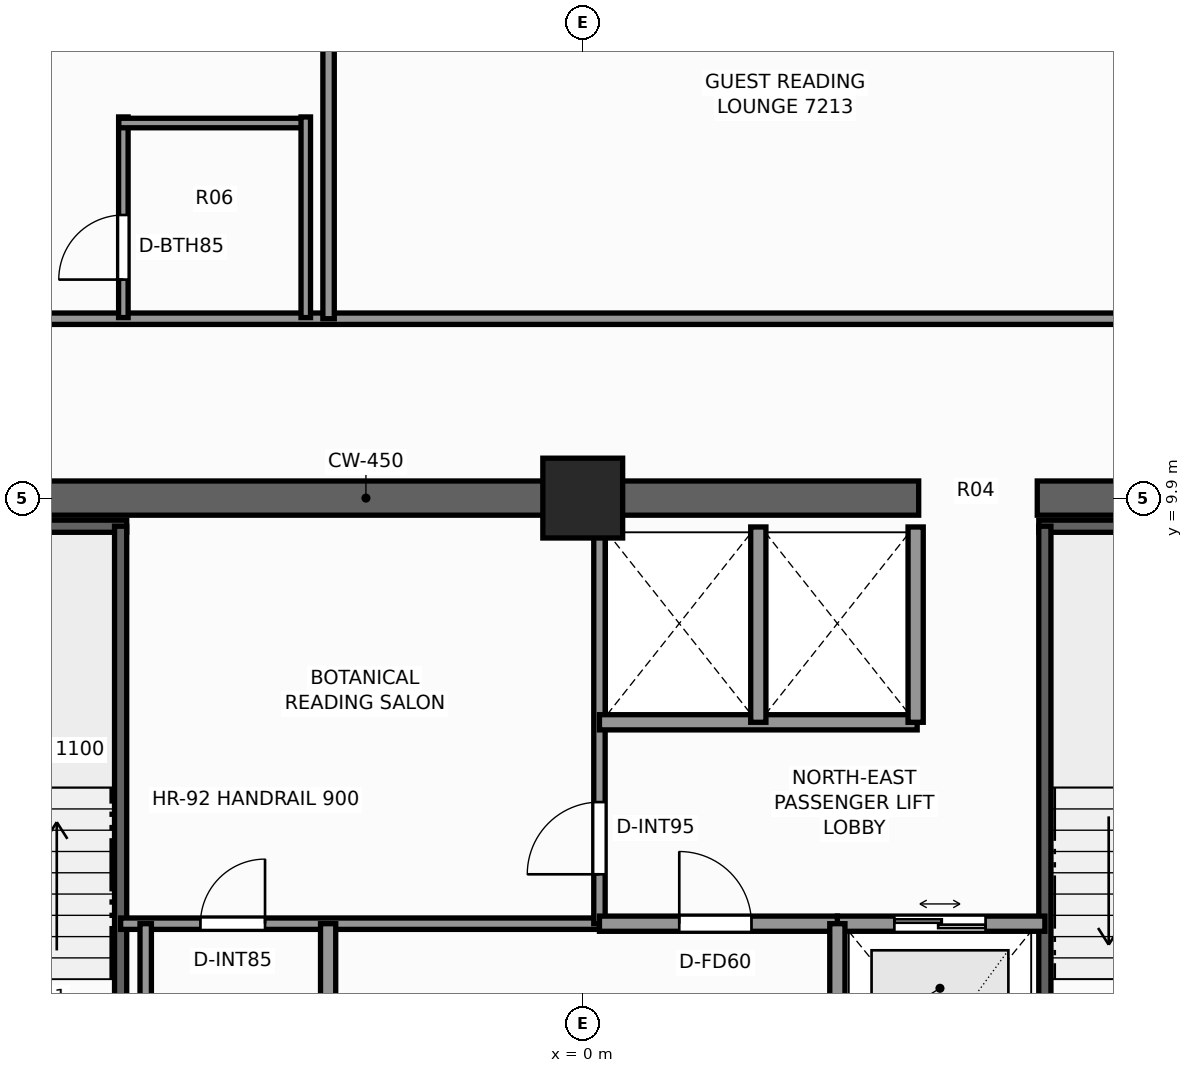
"""IFC4 building model, lengths in metres.
Left out: names, types, materials, properties, quantities, classifications, styles, units other than length and angle.
Written with IfcOpenShell. Run it as: python <this file> out.ifc"""

import sys

from ifc_helpers import new_model, si_unit, direction, frame, frame_2d, origin, origin_2d, place, context, subcontext, project, spatial, rectangle, extrude, element, fill, save


model = new_model("IFC4")
c1 = context("Model", 3, precision=1e-05, world=origin(), true_north=direction((0.0, 1.0)))
c2 = subcontext(c1, "Body", "Model", "MODEL_VIEW")
j1 = project(units=[si_unit("LENGTHUNIT", "METRE"), si_unit("PLANEANGLEUNIT", "RADIAN")], contexts=[c1])
p1 = place(None, origin())
s1 = spatial("IfcSite", under=j1, at=p1, CompositionType="ELEMENT")
p2 = place(p1, origin())
s2 = spatial("IfcBuilding", under=s1, at=p2, CompositionType="ELEMENT")
p3 = place(p2, frame((0.0, 0.0, 247.9)))
s3 = spatial("IfcBuildingStorey", under=s2, at=p3, CompositionType="ELEMENT", Elevation=247.9)
p4 = place(p3, frame((-10.125, 9.9, 0.0), z_axis=(0.0, 0.0, 1.0), x_axis=(1.0, 0.0, 0.0)))
e1 = element("IfcWall", 1, at=p4, inside=s3, PredefinedType="SHEAR", context=c2, shape_type="SweptSolid", body=[
    extrude(rectangle(XDim=14.545, YDim=0.45, at=frame_2d((7.272, 0.0))), origin(), (0.0, 0.0, 1.0), 3.5),
])
p5 = place(p3, frame((5.98, 9.9, 0.0), z_axis=(0.0, 0.0, 1.0), x_axis=(1.0, 0.0, 0.0)))
e2 = element("IfcWall", 2, at=p5, inside=s3, PredefinedType="SHEAR", context=c2, shape_type="SweptSolid", body=[
    extrude(rectangle(XDim=4.145, YDim=0.45, at=frame_2d((2.073, 0.0))), origin(), (0.0, 0.0, 1.0), 3.5),
])
p6 = place(p3, frame((0.0, 9.9, 0.0), z_axis=(0.0, 0.0, 1.0), x_axis=(1.0, 0.0, 0.0)))
e3 = element("IfcColumn", 3, at=p6, inside=s3, PredefinedType="COLUMN", context=c2, shape_type="SweptSolid", body=[
    extrude(rectangle(XDim=1.05, YDim=1.05, at=origin_2d()), origin(), (0.0, 0.0, 1.0), 3.5),
])
p7 = place(p3, frame((-9.52, 9.53, 0.0), z_axis=(0.0, 0.0, 1.0), x_axis=(1.0, 0.0, 0.0)))
e4 = element("IfcWall", 4, at=p7, inside=s3, PredefinedType="SHEAR", context=c2, shape_type="SweptSolid", body=[
    extrude(rectangle(XDim=3.52, YDim=0.16, at=frame_2d((1.76, 0.0))), origin(), (0.0, 0.0, 1.0), 3.5),
])
p8 = place(p3, frame((-6.08, 1.97, 0.0), z_axis=(0.0, 0.0, 1.0), x_axis=(0.0, 1.0, 0.0)))
e5 = element("IfcWall", 5, at=p8, inside=s3, PredefinedType="SHEAR", context=c2, shape_type="SweptSolid", body=[
    extrude(rectangle(XDim=7.56, YDim=0.16, at=frame_2d((3.78, 0.0))), origin(), (0.0, 0.0, 1.0), 3.5),
])
p9 = place(p3, frame((6.0, 9.53, 0.0), z_axis=(0.0, 0.0, 1.0), x_axis=(1.0, 0.0, 0.0)))
e6 = element("IfcWall", 6, at=p9, inside=s3, PredefinedType="SHEAR", context=c2, shape_type="SweptSolid", body=[
    extrude(rectangle(XDim=3.52, YDim=0.16, at=frame_2d((1.76, 0.0))), origin(), (0.0, 0.0, 1.0), 3.5),
])
p10 = place(p3, frame((6.08, 1.97, 0.0), z_axis=(0.0, 0.0, 1.0), x_axis=(0.0, 1.0, 0.0)))
e7 = element("IfcWall", 7, at=p10, inside=s3, PredefinedType="SHEAR", context=c2, shape_type="SweptSolid", body=[
    extrude(rectangle(XDim=7.56, YDim=0.16, at=frame_2d((3.78, 0.0))), origin(), (0.0, 0.0, 1.0), 3.5),
])
p11 = place(p3, frame((3.35, 4.3, 0.0), z_axis=(0.0, 0.0, 1.0), x_axis=(1.0, 0.0, 0.0)))
e8 = element("IfcWall", 8, at=p11, inside=s3, PredefinedType="SOLIDWALL", context=c2, shape_type="SweptSolid", body=[
    extrude(rectangle(XDim=2.73, YDim=0.2, at=frame_2d((1.365, 0.0))), origin(), (0.0, 0.0, 1.0), 3.25),
])
p12 = place(p11, frame((0.75, 0.0, 0.0)))
e9 = element("IfcOpeningElement", 9, at=p12, cuts=e8, PredefinedType="OPENING", context=c2, shape_type="SweptSolid", body=[
    extrude(rectangle(XDim=1.2, YDim=2.25, at=frame_2d((0.6, 1.125))), frame((0.0, 0.11, 0.0), z_axis=(0.0, -1.0, 0.0), x_axis=(1.0, 0.0, 0.0)), (0.0, 0.0, 1.0), 0.22),
])
p13 = place(p3, frame((-6.08, 4.3, 0.0), z_axis=(0.0, 0.0, 1.0), x_axis=(1.0, 0.0, 0.0)))
e10 = element("IfcWall", 10, at=p13, inside=s3, PredefinedType="PARTITIONING", context=c2, shape_type="SweptSolid", body=[
    extrude(rectangle(XDim=6.3, YDim=0.15, at=frame_2d((3.15, 0.0))), origin(), (0.0, 0.0, 1.0), 3.25),
])
p14 = place(p13, frame((1.05, 0.0, 0.0)))
e11 = element("IfcOpeningElement", 11, at=p14, cuts=e10, PredefinedType="OPENING", context=c2, shape_type="SweptSolid", body=[
    extrude(rectangle(XDim=0.85, YDim=2.03, at=frame_2d((0.425, 1.015))), frame((0.0, 0.085, 0.0), z_axis=(0.0, -1.0, 0.0), x_axis=(1.0, 0.0, 0.0)), (0.0, 0.0, 1.0), 0.17),
])
p15 = place(p3, frame((0.22, 4.3, 0.0), z_axis=(0.0, 0.0, 1.0), x_axis=(0.0, 1.0, 0.0)))
e12 = element("IfcWall", 12, at=p15, inside=s3, PredefinedType="PARTITIONING", context=c2, shape_type="SweptSolid", body=[
    extrude(rectangle(XDim=5.22, YDim=0.15, at=frame_2d((2.61, 0.0))), origin(), (0.0, 0.0, 1.0), 3.25),
])
p16 = place(p15, frame((0.65, 0.0, 0.0)))
e13 = element("IfcOpeningElement", 13, at=p16, cuts=e12, PredefinedType="OPENING", context=c2, shape_type="SweptSolid", body=[
    extrude(rectangle(XDim=0.95, YDim=2.06, at=frame_2d((0.475, 1.03))), frame((0.0, 0.085, 0.0), z_axis=(0.0, -1.0, 0.0), x_axis=(1.0, 0.0, 0.0)), (0.0, 0.0, 1.0), 0.17),
])
p17 = place(p3, frame((0.22, 6.95, 0.0), z_axis=(0.0, 0.0, 1.0), x_axis=(1.0, 0.0, 0.0)))
e14 = element("IfcWall", 14, at=p17, inside=s3, PredefinedType="SOLIDWALL", context=c2, shape_type="SweptSolid", body=[
    extrude(rectangle(XDim=4.18, YDim=0.2, at=frame_2d((2.09, 0.0))), origin(), (0.0, 0.0, 1.0), 3.25),
])
for number, where, z_axis, x_axis in (
    (15, (4.38, 6.95, 0.0), (0.0, 0.0, 1.0), (0.0, 1.0, 0.0)),
    (16, (2.31, 6.95, 0.0), (0.0, 0.0, 1.0), (0.0, 1.0, 0.0)),
):
    element("IfcWall", number, at=place(p3, frame(where, z_axis=z_axis, x_axis=x_axis)), inside=s3, PredefinedType="SOLIDWALL", context=c2, shape_type="SweptSolid", body=[
        extrude(rectangle(XDim=2.57, YDim=0.2, at=frame_2d((1.285, 0.0))), origin(), (0.0, 0.0, 1.0), 3.25),
    ])
p18 = place(p3, frame((0.22, 4.3, 0.0), z_axis=(0.0, 0.0, 1.0), x_axis=(1.0, 0.0, 0.0)))
e17 = element("IfcWall", 17, at=p18, inside=s3, PredefinedType="SOLIDWALL", context=c2, shape_type="SweptSolid", body=[
    extrude(rectangle(XDim=3.13, YDim=0.2, at=frame_2d((1.565, 0.0))), origin(), (0.0, 0.0, 1.0), 3.25),
])
p19 = place(p18, frame((1.05, 0.0, 0.0)))
e18 = element("IfcOpeningElement", 18, at=p19, cuts=e17, PredefinedType="OPENING", context=c2, shape_type="SweptSolid", body=[
    extrude(rectangle(XDim=0.95, YDim=2.06, at=frame_2d((0.475, 1.03))), frame((0.0, 0.11, 0.0), z_axis=(0.0, -1.0, 0.0), x_axis=(1.0, 0.0, 0.0)), (0.0, 0.0, 1.0), 0.22),
])
for number, where, z_axis, x_axis in (
    (19, (-3.35, 1.1, 0.0), (0.0, 0.0, 1.0), (0.0, 1.0, 0.0)),
    (20, (3.35, 1.1, 0.0), (0.0, 0.0, 1.0), (0.0, 1.0, 0.0)),
):
    element("IfcWall", number, at=place(p3, frame(where, z_axis=z_axis, x_axis=x_axis)), inside=s3, PredefinedType="SOLIDWALL", context=c2, shape_type="SweptSolid", body=[
        extrude(rectangle(XDim=3.2, YDim=0.2, at=frame_2d((1.6, 0.0))), origin(), (0.0, 0.0, 1.0), 3.25),
    ])
p20 = place(p3, frame((-5.75, 1.97, 0.0), z_axis=(0.0, 0.0, 1.0), x_axis=(0.0, 1.0, 0.0)))
e21 = element("IfcWall", 21, at=p20, inside=s3, PredefinedType="PARTITIONING", context=c2, shape_type="SweptSolid", body=[
    extrude(rectangle(XDim=2.33, YDim=0.15, at=frame_2d((1.165, 0.0))), origin(), (0.0, 0.0, 1.0), 3.25),
])
p21 = place(p3, frame((-12.58, 12.26, 0.0), z_axis=(0.0, 0.0, 1.0), x_axis=(1.0, 0.0, 0.0)))
e22 = element("IfcWall", 22, at=p21, inside=s3, PredefinedType="PARTITIONING", context=c2, shape_type="SweptSolid", body=[
    extrude(rectangle(XDim=24.84, YDim=0.15, at=frame_2d((12.42, 0.0))), origin(), (0.0, 0.0, 1.0), 2.539),
])
p22 = place(p21, frame((4.073, 0.0, 0.0)))
e23 = element("IfcOpeningElement", 23, at=p22, cuts=e22, PredefinedType="OPENING", context=c2, shape_type="SweptSolid", body=[
    extrude(rectangle(XDim=0.95, YDim=2.06, at=frame_2d((0.475, 1.03))), frame((0.0, 0.085, 0.0), z_axis=(0.0, -1.0, 0.0), x_axis=(1.0, 0.0, 0.0)), (0.0, 0.0, 1.0), 0.17),
])
p23 = place(p21, frame((19.665, 0.0, 0.0)))
e24 = element("IfcOpeningElement", 24, at=p23, cuts=e22, PredefinedType="OPENING", context=c2, shape_type="SweptSolid", body=[
    extrude(rectangle(XDim=0.9, YDim=2.06, at=frame_2d((0.45, 1.03))), frame((0.0, 0.085, 0.0), z_axis=(0.0, -1.0, 0.0), x_axis=(1.0, 0.0, 0.0)), (0.0, 0.0, 1.0), 0.17),
])
p24 = place(p3, frame((-3.344, 12.26, 0.0), z_axis=(0.0, 0.0, 1.0), x_axis=(0.0, 1.0, 0.0)))
e25 = element("IfcWall", 25, at=p24, inside=s3, PredefinedType="PARTITIONING", context=c2, shape_type="SweptSolid", body=[
    extrude(rectangle(XDim=6.12, YDim=0.15, at=frame_2d((3.06, 0.0))), origin(), (0.0, 0.0, 1.0), 2.539),
])
p25 = place(p3, frame((-6.044, 12.275, 0.0), z_axis=(0.0, 0.0, 1.0), x_axis=(0.0, 1.0, 0.0)))
e26 = element("IfcWall", 26, at=p25, inside=s3, PredefinedType="PARTITIONING", context=c2, shape_type="SweptSolid", body=[
    extrude(rectangle(XDim=2.64, YDim=0.125, at=frame_2d((1.32, 0.0))), origin(), (0.0, 0.0, 1.0), 3.25),
])
p26 = place(p25, frame((0.5, 0.0, 0.0)))
e27 = element("IfcOpeningElement", 27, at=p26, cuts=e26, PredefinedType="OPENING", context=c2, shape_type="SweptSolid", body=[
    extrude(rectangle(XDim=0.85, YDim=2.03, at=frame_2d((0.425, 1.015))), frame((0.0, 0.073, 0.0), z_axis=(0.0, -1.0, 0.0), x_axis=(1.0, 0.0, 0.0)), (0.0, 0.0, 1.0), 0.145),
])
p27 = place(p3, frame((-6.104, 14.835, 0.0), z_axis=(0.0, 0.0, 1.0), x_axis=(1.0, 0.0, 0.0)))
e28 = element("IfcWall", 28, at=p27, inside=s3, PredefinedType="PARTITIONING", context=c2, shape_type="SweptSolid", body=[
    extrude(rectangle(XDim=2.52, YDim=0.125, at=frame_2d((1.26, 0.0))), origin(), (0.0, 0.0, 1.0), 2.539),
])
p28 = place(p3, frame((-3.644, 12.275, 0.0), z_axis=(0.0, 0.0, 1.0), x_axis=(0.0, 1.0, 0.0)))
e29 = element("IfcWall", 29, at=p28, inside=s3, PredefinedType="PARTITIONING", context=c2, shape_type="SweptSolid", body=[
    extrude(rectangle(XDim=2.64, YDim=0.125, at=frame_2d((1.32, 0.0))), origin(), (0.0, 0.0, 1.0), 3.25),
])
p29 = place(p12, origin())
e30 = element("IfcDoor", 30, at=p29, inside=s3, OperationType="DOUBLE_DOOR_SLIDING", PredefinedType="DOOR", context=c2, shape_type="SweptSolid", body=[
    extrude(rectangle(XDim=1.2, YDim=2.25, at=frame_2d((0.6, 1.125))), frame((0.0, 0.025, 0.0), z_axis=(0.0, -1.0, 0.0), x_axis=(1.0, 0.0, 0.0)), (0.0, 0.0, 1.0), 0.05),
])
fill(e9, e30)
p30 = place(p16, origin())
e31 = element("IfcDoor", 31, at=p30, inside=s3, OperationType="SINGLE_SWING_LEFT", PredefinedType="DOOR", context=c2, shape_type="SweptSolid", body=[
    extrude(rectangle(XDim=0.95, YDim=2.06, at=frame_2d((0.475, 1.03))), frame((0.0, 0.025, 0.0), z_axis=(0.0, -1.0, 0.0), x_axis=(1.0, 0.0, 0.0)), (0.0, 0.0, 1.0), 0.05),
])
fill(e13, e31)
p31 = place(p19, origin())
e32 = element("IfcDoor", 32, at=p31, inside=s3, OperationType="SINGLE_SWING_LEFT", PredefinedType="DOOR", context=c2, shape_type="SweptSolid", body=[
    extrude(rectangle(XDim=0.95, YDim=2.06, at=frame_2d((0.475, 1.03))), frame((0.0, 0.025, 0.0), z_axis=(0.0, -1.0, 0.0), x_axis=(1.0, 0.0, 0.0)), (0.0, 0.0, 1.0), 0.05),
])
fill(e18, e32)
p32 = place(p14, origin())
e33 = element("IfcDoor", 33, at=p32, inside=s3, OperationType="SINGLE_SWING_RIGHT", PredefinedType="DOOR", context=c2, shape_type="SweptSolid", body=[
    extrude(rectangle(XDim=0.85, YDim=2.03, at=frame_2d((0.425, 1.015))), frame((0.0, 0.025, 0.0), z_axis=(0.0, -1.0, 0.0), x_axis=(1.0, 0.0, 0.0)), (0.0, 0.0, 1.0), 0.05),
])
fill(e11, e33)
p33 = place(p26, origin())
e34 = element("IfcDoor", 34, at=p33, inside=s3, OperationType="SINGLE_SWING_LEFT", PredefinedType="DOOR", context=c2, shape_type="SweptSolid", body=[
    extrude(rectangle(XDim=0.85, YDim=2.03, at=frame_2d((0.425, 1.015))), frame((0.0, 0.025, 0.0), z_axis=(0.0, -1.0, 0.0), x_axis=(1.0, 0.0, 0.0)), (0.0, 0.0, 1.0), 0.05),
])
fill(e27, e34)
save(model, sys.argv[1])
